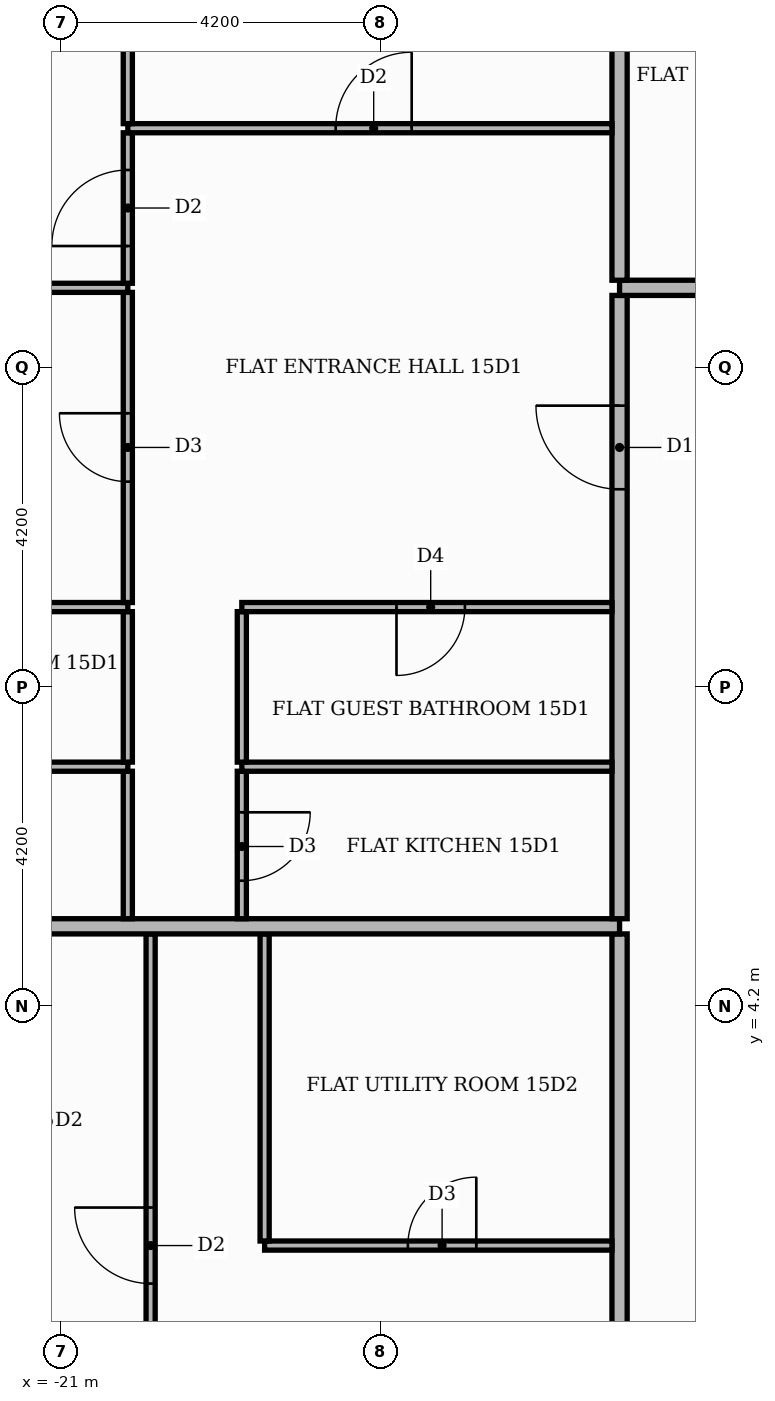
"""IFC4 building model, lengths in metres.
Left out: names, types, materials, properties, quantities, classifications, styles, units other than length and angle.
Written with IfcOpenShell. Run it as: python <this file> out.ifc"""

import sys

from ifc_helpers import new_model, si_unit, direction, frame, frame_2d, origin, place, context, subcontext, project, spatial, rectangle, extrude, element, fill, save


model = new_model("IFC4")
c1 = context("Model", 3, precision=1e-05, world=origin(), true_north=direction((0.0, 1.0)))
c2 = subcontext(c1, "Body", "Model", "MODEL_VIEW")
j1 = project(units=[si_unit("LENGTHUNIT", "METRE"), si_unit("PLANEANGLEUNIT", "RADIAN")], contexts=[c1])
p1 = place(None, origin())
s1 = spatial("IfcSite", under=j1, at=p1, CompositionType="ELEMENT")
p2 = place(p1, origin())
s2 = spatial("IfcBuilding", under=s1, at=p2, CompositionType="ELEMENT")
p3 = place(p2, frame((0.0, 0.0, 66.0)))
s3 = spatial("IfcBuildingStorey", under=s2, at=p3, CompositionType="ELEMENT", Elevation=66.0)
p4 = place(p3, frame((-13.65, -13.55, 0.0), z_axis=(0.0, 0.0, 1.0), x_axis=(0.0, 1.0, 0.0)))
e1 = element("IfcWall", 1, at=p4, inside=s3, PredefinedType="PARTITIONING", context=c2, shape_type="SweptSolid", body=[
    extrude(rectangle(XDim=18.7, YDim=0.2, at=frame_2d((9.35, 0.0))), origin(), (0.0, 0.0, 1.0), 3.48),
])
p5 = place(p4, frame((11.95, 0.0, 0.0)))
e2 = element("IfcOpeningElement", 2, at=p5, cuts=e1, PredefinedType="OPENING", context=c2, shape_type="SweptSolid", body=[
    extrude(rectangle(XDim=1.1, YDim=2.4, at=frame_2d((0.55, 1.2))), frame((0.0, 0.11, 0.0), z_axis=(0.0, -1.0, 0.0), x_axis=(1.0, 0.0, 0.0)), (0.0, 0.0, 1.0), 0.22),
])
p6 = place(p3, frame((-19.82, -3.09, 0.0), z_axis=(0.0, 0.0, 1.0), x_axis=(0.0, 1.0, 0.0)))
e3 = element("IfcWall", 3, at=p6, inside=s3, PredefinedType="PARTITIONING", context=c2, shape_type="SweptSolid", body=[
    extrude(rectangle(XDim=8.24, YDim=0.12, at=frame_2d((4.12, 0.0))), origin(), (0.0, 0.0, 1.0), 3.48),
])
p7 = place(p6, frame((3.64, 0.0, 0.0)))
e4 = element("IfcOpeningElement", 4, at=p7, cuts=e3, PredefinedType="OPENING", context=c2, shape_type="SweptSolid", body=[
    extrude(rectangle(XDim=1.0, YDim=2.1, at=frame_2d((0.5, 1.05))), frame((0.0, 0.07, 0.0), z_axis=(0.0, -1.0, 0.0), x_axis=(1.0, 0.0, 0.0)), (0.0, 0.0, 1.0), 0.14),
])
p8 = place(p3, frame((-18.32, 1.05, 0.0), z_axis=(0.0, 0.0, 1.0), x_axis=(1.0, 0.0, 0.0)))
e5 = element("IfcWall", 5, at=p8, inside=s3, PredefinedType="PARTITIONING", context=c2, shape_type="SweptSolid", body=[
    extrude(rectangle(XDim=4.57, YDim=0.12, at=frame_2d((2.285, 0.0))), origin(), (0.0, 0.0, 1.0), 3.48),
])
p9 = place(p8, frame((1.885, 0.0, 0.0)))
e6 = element("IfcOpeningElement", 6, at=p9, cuts=e5, PredefinedType="OPENING", context=c2, shape_type="SweptSolid", body=[
    extrude(rectangle(XDim=0.9, YDim=2.1, at=frame_2d((0.45, 1.05))), frame((0.0, 0.07, 0.0), z_axis=(0.0, -1.0, 0.0), x_axis=(1.0, 0.0, 0.0)), (0.0, 0.0, 1.0), 0.14),
])
p10 = place(p3, frame((-18.32, 1.11, 0.0), z_axis=(0.0, 0.0, 1.0), x_axis=(0.0, 1.0, 0.0)))
e7 = element("IfcWall", 7, at=p10, inside=s3, PredefinedType="PARTITIONING", context=c2, shape_type="SweptSolid", body=[
    extrude(rectangle(XDim=4.04, YDim=0.12, at=frame_2d((2.02, 0.0))), origin(), (0.0, 0.0, 1.0), 3.48),
])
p11 = place(p3, frame((-25.42, 5.25, 0.0), z_axis=(0.0, 0.0, 1.0), x_axis=(1.0, 0.0, 0.0)))
e8 = element("IfcWall", 8, at=p11, inside=s3, PredefinedType="PARTITIONING", context=c2, shape_type="SweptSolid", body=[
    extrude(rectangle(XDim=11.77, YDim=0.2, at=frame_2d((5.885, 0.0))), origin(), (0.0, 0.0, 1.0), 3.48),
])
p12 = place(p3, frame((-20.12, 5.35, 0.0), z_axis=(0.0, 0.0, 1.0), x_axis=(0.0, 1.0, 0.0)))
e9 = element("IfcWall", 9, at=p12, inside=s3, PredefinedType="PARTITIONING", context=c2, shape_type="SweptSolid", body=[
    extrude(rectangle(XDim=1.94, YDim=0.12, at=frame_2d((0.97, 0.0))), origin(), (0.0, 0.0, 1.0), 3.48),
])
p13 = place(p3, frame((-18.62, 5.35, 0.0), z_axis=(0.0, 0.0, 1.0), x_axis=(0.0, 1.0, 0.0)))
e10 = element("IfcWall", 10, at=p13, inside=s3, PredefinedType="PARTITIONING", context=c2, shape_type="SweptSolid", body=[
    extrude(rectangle(XDim=1.94, YDim=0.12, at=frame_2d((0.97, 0.0))), origin(), (0.0, 0.0, 1.0), 3.48),
])
p14 = place(p13, frame((0.5, 0.0, 0.0)))
e11 = element("IfcOpeningElement", 11, at=p14, cuts=e10, PredefinedType="OPENING", context=c2, shape_type="SweptSolid", body=[
    extrude(rectangle(XDim=0.9, YDim=2.1, at=frame_2d((0.45, 1.05))), frame((0.0, 0.07, 0.0), z_axis=(0.0, -1.0, 0.0), x_axis=(1.0, 0.0, 0.0)), (0.0, 0.0, 1.0), 0.14),
])
p15 = place(p3, frame((-13.65, 5.35, 0.0), z_axis=(0.0, 0.0, 1.0), x_axis=(0.0, 1.0, 0.0)))
e12 = element("IfcWall", 12, at=p15, inside=s3, PredefinedType="PARTITIONING", context=c2, shape_type="SweptSolid", body=[
    extrude(rectangle(XDim=8.2, YDim=0.2, at=frame_2d((4.1, 0.0))), origin(), (0.0, 0.0, 1.0), 3.48),
])
p16 = place(p15, frame((5.65, 0.0, 0.0)))
e13 = element("IfcOpeningElement", 13, at=p16, cuts=e12, PredefinedType="OPENING", context=c2, shape_type="SweptSolid", body=[
    extrude(rectangle(XDim=1.1, YDim=2.4, at=frame_2d((0.55, 1.2))), frame((0.0, 0.11, 0.0), z_axis=(0.0, -1.0, 0.0), x_axis=(1.0, 0.0, 0.0)), (0.0, 0.0, 1.0), 0.22),
])
p17 = place(p3, frame((-25.42, 7.35, 0.0), z_axis=(0.0, 0.0, 1.0), x_axis=(1.0, 0.0, 0.0)))
e14 = element("IfcWall", 14, at=p17, inside=s3, PredefinedType="PARTITIONING", context=c2, shape_type="SweptSolid", body=[
    extrude(rectangle(XDim=5.3, YDim=0.12, at=frame_2d((2.65, 0.0))), origin(), (0.0, 0.0, 1.0), 3.48),
])
p18 = place(p17, frame((2.05, 0.0, 0.0)))
e15 = element("IfcOpeningElement", 15, at=p18, cuts=e14, PredefinedType="OPENING", context=c2, shape_type="SweptSolid", body=[
    extrude(rectangle(XDim=0.9, YDim=2.1, at=frame_2d((0.45, 1.05))), frame((0.0, 0.07, 0.0), z_axis=(0.0, -1.0, 0.0), x_axis=(1.0, 0.0, 0.0)), (0.0, 0.0, 1.0), 0.14),
])
p19 = place(p3, frame((-18.62, 7.35, 0.0), z_axis=(0.0, 0.0, 1.0), x_axis=(1.0, 0.0, 0.0)))
e16 = element("IfcWall", 16, at=p19, inside=s3, PredefinedType="PARTITIONING", context=c2, shape_type="SweptSolid", body=[
    extrude(rectangle(XDim=4.87, YDim=0.12, at=frame_2d((2.435, 0.0))), origin(), (0.0, 0.0, 1.0), 3.48),
])
for number, where, z_axis, x_axis in (
    (17, (-20.12, 7.41, 0.0), (0.0, 0.0, 1.0), (0.0, 1.0, 0.0)),
    (18, (-18.62, 7.41, 0.0), (0.0, 0.0, 1.0), (0.0, 1.0, 0.0)),
):
    element("IfcWall", number, at=place(p3, frame(where, z_axis=z_axis, x_axis=x_axis)), inside=s3, PredefinedType="PARTITIONING", context=c2, shape_type="SweptSolid", body=[
        extrude(rectangle(XDim=1.98, YDim=0.12, at=frame_2d((0.99, 0.0))), origin(), (0.0, 0.0, 1.0), 3.48),
    ])
p20 = place(p3, frame((-25.42, 9.45, 0.0), z_axis=(0.0, 0.0, 1.0), x_axis=(1.0, 0.0, 0.0)))
e19 = element("IfcWall", 19, at=p20, inside=s3, PredefinedType="PARTITIONING", context=c2, shape_type="SweptSolid", body=[
    extrude(rectangle(XDim=5.3, YDim=0.12, at=frame_2d((2.65, 0.0))), origin(), (0.0, 0.0, 1.0), 3.48),
])
p21 = place(p20, frame((2.05, 0.0, 0.0)))
e20 = element("IfcOpeningElement", 20, at=p21, cuts=e19, PredefinedType="OPENING", context=c2, shape_type="SweptSolid", body=[
    extrude(rectangle(XDim=0.9, YDim=2.1, at=frame_2d((0.45, 1.05))), frame((0.0, 0.07, 0.0), z_axis=(0.0, -1.0, 0.0), x_axis=(1.0, 0.0, 0.0)), (0.0, 0.0, 1.0), 0.14),
])
p22 = place(p3, frame((-18.62, 9.45, 0.0), z_axis=(0.0, 0.0, 1.0), x_axis=(1.0, 0.0, 0.0)))
e21 = element("IfcWall", 21, at=p22, inside=s3, PredefinedType="PARTITIONING", context=c2, shape_type="SweptSolid", body=[
    extrude(rectangle(XDim=4.87, YDim=0.12, at=frame_2d((2.435, 0.0))), origin(), (0.0, 0.0, 1.0), 3.48),
])
p23 = place(p22, frame((2.035, 0.0, 0.0)))
e22 = element("IfcOpeningElement", 22, at=p23, cuts=e21, PredefinedType="OPENING", context=c2, shape_type="SweptSolid", body=[
    extrude(rectangle(XDim=0.9, YDim=2.1, at=frame_2d((0.45, 1.05))), frame((0.0, 0.07, 0.0), z_axis=(0.0, -1.0, 0.0), x_axis=(1.0, 0.0, 0.0)), (0.0, 0.0, 1.0), 0.14),
])
p24 = place(p3, frame((-20.12, 9.51, 0.0), z_axis=(0.0, 0.0, 1.0), x_axis=(0.0, 1.0, 0.0)))
e23 = element("IfcWall", 23, at=p24, inside=s3, PredefinedType="PARTITIONING", context=c2, shape_type="SweptSolid", body=[
    extrude(rectangle(XDim=4.08, YDim=0.12, at=frame_2d((2.04, 0.0))), origin(), (0.0, 0.0, 1.0), 3.48),
])
p25 = place(p24, frame((1.59, 0.0, 0.0)))
e24 = element("IfcOpeningElement", 24, at=p25, cuts=e23, PredefinedType="OPENING", context=c2, shape_type="SweptSolid", body=[
    extrude(rectangle(XDim=0.9, YDim=2.1, at=frame_2d((0.45, 1.05))), frame((0.0, 0.07, 0.0), z_axis=(0.0, -1.0, 0.0), x_axis=(1.0, 0.0, 0.0)), (0.0, 0.0, 1.0), 0.14),
])
p26 = place(p3, frame((-25.42, 13.65, 0.0), z_axis=(0.0, 0.0, 1.0), x_axis=(1.0, 0.0, 0.0)))
e25 = element("IfcWall", 25, at=p26, inside=s3, PredefinedType="PARTITIONING", context=c2, shape_type="SweptSolid", body=[
    extrude(rectangle(XDim=5.3, YDim=0.12, at=frame_2d((2.65, 0.0))), origin(), (0.0, 0.0, 1.0), 3.48),
])
p27 = place(p3, frame((-13.65, 13.65, 0.0), z_axis=(0.0, 0.0, 1.0), x_axis=(1.0, 0.0, 0.0)))
e26 = element("IfcWall", 26, at=p27, inside=s3, PredefinedType="PARTITIONING", context=c2, shape_type="SweptSolid", body=[
    extrude(rectangle(XDim=39.07, YDim=0.2, at=frame_2d((19.535, 0.0))), origin(), (0.0, 0.0, 1.0), 3.48),
])
p28 = place(p27, frame((23.6, 0.0, 0.0)))
e27 = element("IfcOpeningElement", 27, at=p28, cuts=e26, PredefinedType="OPENING", context=c2, shape_type="SweptSolid", body=[
    extrude(rectangle(XDim=1.1, YDim=2.4, at=frame_2d((0.55, 1.2))), frame((0.0, 0.11, 0.0), z_axis=(0.0, -1.0, 0.0), x_axis=(1.0, 0.0, 0.0)), (0.0, 0.0, 1.0), 0.22),
])
p29 = place(p3, frame((-20.12, 13.71, 0.0), z_axis=(0.0, 0.0, 1.0), x_axis=(0.0, 1.0, 0.0)))
e28 = element("IfcWall", 28, at=p29, inside=s3, PredefinedType="PARTITIONING", context=c2, shape_type="SweptSolid", body=[
    extrude(rectangle(XDim=1.98, YDim=0.12, at=frame_2d((0.99, 0.0))), origin(), (0.0, 0.0, 1.0), 3.48),
])
p30 = place(p29, frame((0.49, 0.0, 0.0)))
e29 = element("IfcOpeningElement", 29, at=p30, cuts=e28, PredefinedType="OPENING", context=c2, shape_type="SweptSolid", body=[
    extrude(rectangle(XDim=1.0, YDim=2.1, at=frame_2d((0.5, 1.05))), frame((0.0, 0.07, 0.0), z_axis=(0.0, -1.0, 0.0), x_axis=(1.0, 0.0, 0.0)), (0.0, 0.0, 1.0), 0.14),
])
p31 = place(p3, frame((-13.65, 13.75, 0.0), z_axis=(0.0, 0.0, 1.0), x_axis=(0.0, 1.0, 0.0)))
e30 = element("IfcWall", 30, at=p31, inside=s3, PredefinedType="PARTITIONING", context=c2, shape_type="SweptSolid", body=[
    extrude(rectangle(XDim=11.67, YDim=0.2, at=frame_2d((5.835, 0.0))), origin(), (0.0, 0.0, 1.0), 3.48),
])
p32 = place(p3, frame((-20.12, 15.75, 0.0), z_axis=(0.0, 0.0, 1.0), x_axis=(1.0, 0.0, 0.0)))
e31 = element("IfcWall", 31, at=p32, inside=s3, PredefinedType="PARTITIONING", context=c2, shape_type="SweptSolid", body=[
    extrude(rectangle(XDim=6.37, YDim=0.12, at=frame_2d((3.185, 0.0))), origin(), (0.0, 0.0, 1.0), 3.48),
])
p33 = place(p32, frame((2.735, 0.0, 0.0)))
e32 = element("IfcOpeningElement", 32, at=p33, cuts=e31, PredefinedType="OPENING", context=c2, shape_type="SweptSolid", body=[
    extrude(rectangle(XDim=1.0, YDim=2.1, at=frame_2d((0.5, 1.05))), frame((0.0, 0.07, 0.0), z_axis=(0.0, -1.0, 0.0), x_axis=(1.0, 0.0, 0.0)), (0.0, 0.0, 1.0), 0.14),
])
p34 = place(p3, frame((-20.12, 15.81, 0.0), z_axis=(0.0, 0.0, 1.0), x_axis=(0.0, 1.0, 0.0)))
e33 = element("IfcWall", 33, at=p34, inside=s3, PredefinedType="PARTITIONING", context=c2, shape_type="SweptSolid", body=[
    extrude(rectangle(XDim=1.49, YDim=0.12, at=frame_2d((0.745, 0.0))), origin(), (0.0, 0.0, 1.0), 3.48),
])
p35 = place(p16, origin())
e34 = element("IfcDoor", 34, at=p35, inside=s3, OperationType="SINGLE_SWING_RIGHT", PredefinedType="DOOR", context=c2, shape_type="SweptSolid", body=[
    extrude(rectangle(XDim=1.1, YDim=2.4, at=frame_2d((0.55, 1.2))), frame((0.0, 0.025, 0.0), z_axis=(0.0, -1.0, 0.0), x_axis=(1.0, 0.0, 0.0)), (0.0, 0.0, 1.0), 0.05),
])
fill(e13, e34)
p36 = place(p33, origin())
e35 = element("IfcDoor", 35, at=p36, inside=s3, OperationType="SINGLE_SWING_RIGHT", PredefinedType="DOOR", context=c2, shape_type="SweptSolid", body=[
    extrude(rectangle(XDim=1.0, YDim=2.1, at=frame_2d((0.5, 1.05))), frame((0.0, 0.025, 0.0), z_axis=(0.0, -1.0, 0.0), x_axis=(1.0, 0.0, 0.0)), (0.0, 0.0, 1.0), 0.05),
])
fill(e32, e35)
p37 = place(p23, frame((0.9, 0.0, 0.0), z_axis=(0.0, 0.0, 1.0), x_axis=(-1.0, 0.0, 0.0)))
e36 = element("IfcDoor", 36, at=p37, inside=s3, OperationType="SINGLE_SWING_LEFT", PredefinedType="DOOR", context=c2, shape_type="SweptSolid", body=[
    extrude(rectangle(XDim=0.9, YDim=2.1, at=frame_2d((0.45, 1.05))), frame((0.0, 0.025, 0.0), z_axis=(0.0, -1.0, 0.0), x_axis=(1.0, 0.0, 0.0)), (0.0, 0.0, 1.0), 0.05),
])
fill(e22, e36)
p38 = place(p14, frame((0.9, 0.0, 0.0), z_axis=(0.0, 0.0, 1.0), x_axis=(-1.0, 0.0, 0.0)))
e37 = element("IfcDoor", 37, at=p38, inside=s3, OperationType="SINGLE_SWING_RIGHT", PredefinedType="DOOR", context=c2, shape_type="SweptSolid", body=[
    extrude(rectangle(XDim=0.9, YDim=2.1, at=frame_2d((0.45, 1.05))), frame((0.0, 0.025, 0.0), z_axis=(0.0, -1.0, 0.0), x_axis=(1.0, 0.0, 0.0)), (0.0, 0.0, 1.0), 0.05),
])
fill(e11, e37)
p39 = place(p30, origin())
e38 = element("IfcDoor", 38, at=p39, inside=s3, OperationType="SINGLE_SWING_LEFT", PredefinedType="DOOR", context=c2, shape_type="SweptSolid", body=[
    extrude(rectangle(XDim=1.0, YDim=2.1, at=frame_2d((0.5, 1.05))), frame((0.0, 0.025, 0.0), z_axis=(0.0, -1.0, 0.0), x_axis=(1.0, 0.0, 0.0)), (0.0, 0.0, 1.0), 0.05),
])
fill(e29, e38)
p40 = place(p25, origin())
e39 = element("IfcDoor", 39, at=p40, inside=s3, OperationType="SINGLE_SWING_RIGHT", PredefinedType="DOOR", context=c2, shape_type="SweptSolid", body=[
    extrude(rectangle(XDim=0.9, YDim=2.1, at=frame_2d((0.45, 1.05))), frame((0.0, 0.025, 0.0), z_axis=(0.0, -1.0, 0.0), x_axis=(1.0, 0.0, 0.0)), (0.0, 0.0, 1.0), 0.05),
])
fill(e24, e39)
p41 = place(p9, origin())
e40 = element("IfcDoor", 40, at=p41, inside=s3, OperationType="SINGLE_SWING_RIGHT", PredefinedType="DOOR", context=c2, shape_type="SweptSolid", body=[
    extrude(rectangle(XDim=0.9, YDim=2.1, at=frame_2d((0.45, 1.05))), frame((0.0, 0.025, 0.0), z_axis=(0.0, -1.0, 0.0), x_axis=(1.0, 0.0, 0.0)), (0.0, 0.0, 1.0), 0.05),
])
fill(e6, e40)
p42 = place(p7, origin())
e41 = element("IfcDoor", 41, at=p42, inside=s3, OperationType="SINGLE_SWING_RIGHT", PredefinedType="DOOR", context=c2, shape_type="SweptSolid", body=[
    extrude(rectangle(XDim=1.0, YDim=2.1, at=frame_2d((0.5, 1.05))), frame((0.0, 0.025, 0.0), z_axis=(0.0, -1.0, 0.0), x_axis=(1.0, 0.0, 0.0)), (0.0, 0.0, 1.0), 0.05),
])
fill(e4, e41)
save(model, sys.argv[1])
